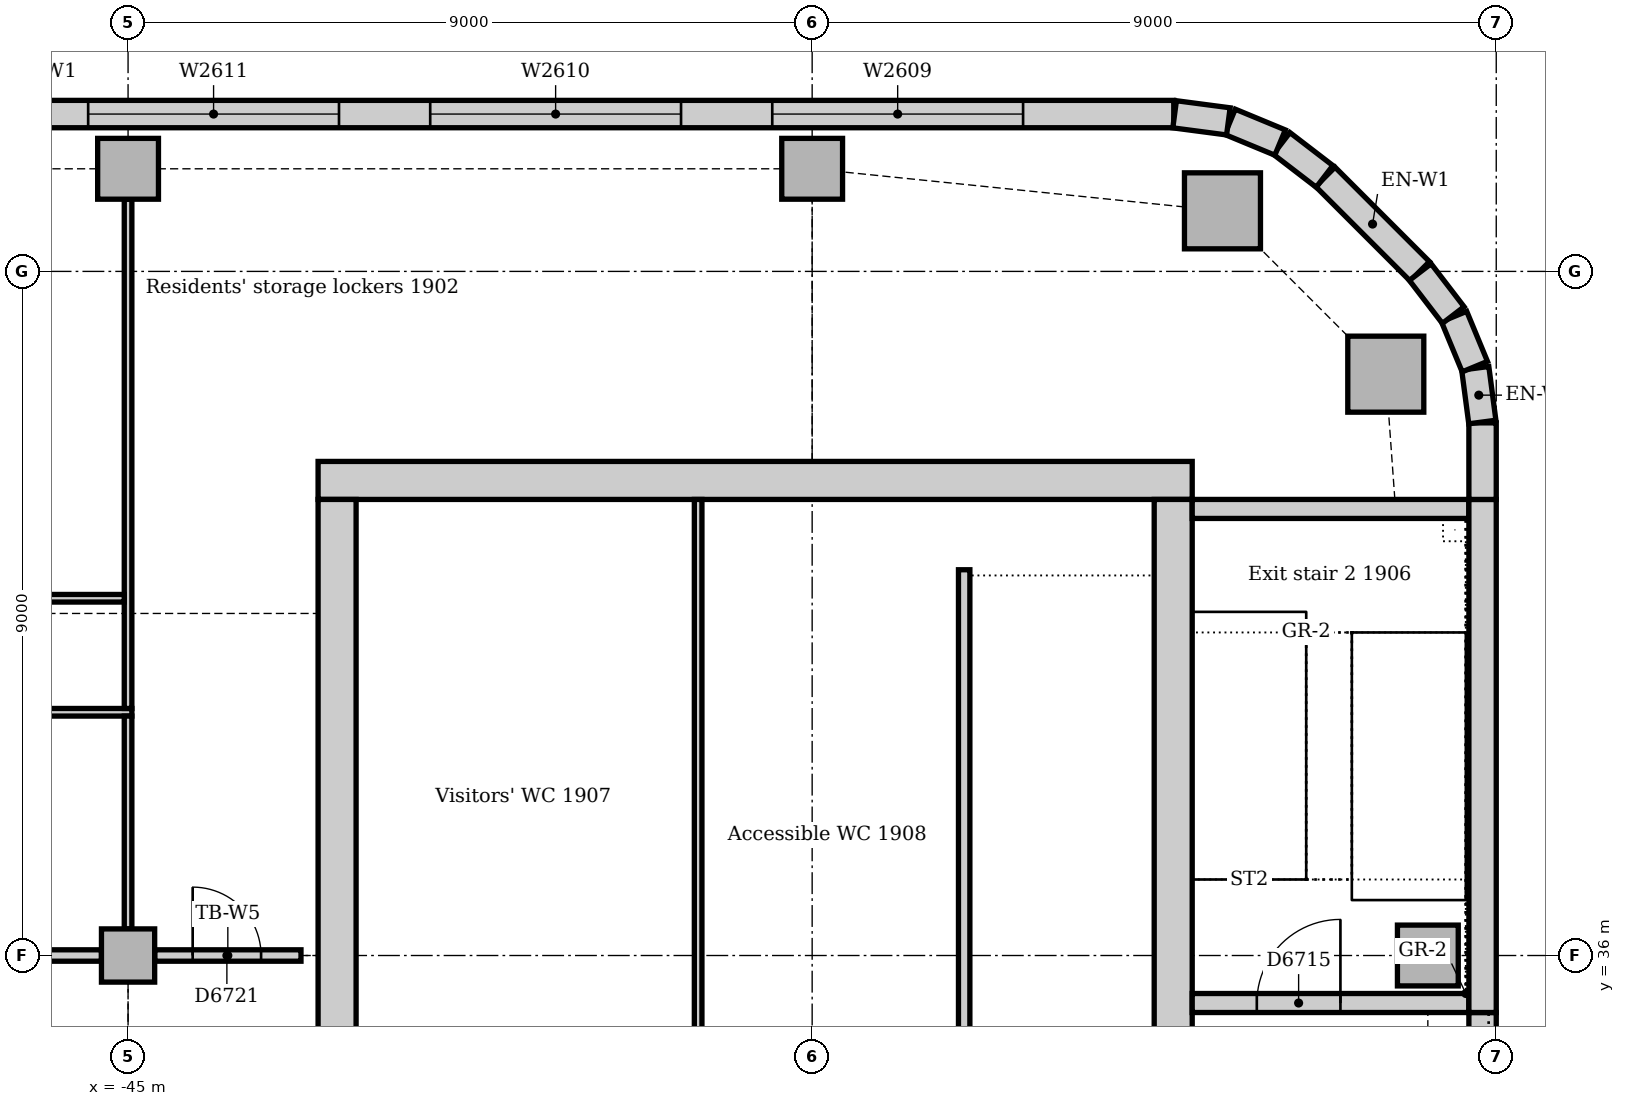
"""IFC4 building model, lengths in metres.
Left out: names, types, materials, properties, quantities, classifications, styles, units other than length and angle.
Written with IfcOpenShell. Run it as: python <this file> out.ifc"""

import sys

from ifc_helpers import new_model, si_unit, direction, frame, frame_2d, origin, origin_2d, place, context, subcontext, project, spatial, rectangle, extrude, element, fill, save


model = new_model("IFC4")
c1 = context("Model", 3, precision=1e-05, world=origin(), true_north=direction((0.0, 1.0)))
c2 = subcontext(c1, "Body", "Model", "MODEL_VIEW")
j1 = project(units=[si_unit("LENGTHUNIT", "METRE"), si_unit("PLANEANGLEUNIT", "RADIAN")], contexts=[c1])
p1 = place(None, origin())
s1 = spatial("IfcSite", under=j1, at=p1, CompositionType="ELEMENT")
p2 = place(p1, origin())
s2 = spatial("IfcBuilding", under=s1, at=p2, CompositionType="ELEMENT")
p3 = place(p2, frame((0.0, 0.0, 83.0)))
s3 = spatial("IfcBuildingStorey", under=s2, at=p3, CompositionType="ELEMENT", Elevation=83.0)
p4 = place(p3, frame((-31.0, 42.25, 0.0), z_axis=(0.0, 0.0, 1.0), x_axis=(-1.0, 0.0, 0.0)))
e1 = element("IfcWall", 1, at=p4, inside=s3, PredefinedType="SOLIDWALL", context=c2, shape_type="SweptSolid", body=[
    extrude(rectangle(XDim=11.5, YDim=0.5, at=frame_2d((5.75, 0.0))), origin(), (0.0, 0.0, 1.0), 4.0),
])
p5 = place(p3, frame((-31.25, 30.5, 0.0), z_axis=(0.0, 0.0, 1.0), x_axis=(0.0, 1.0, 0.0)))
e2 = element("IfcWall", 2, at=p5, inside=s3, PredefinedType="SOLIDWALL", context=c2, shape_type="SweptSolid", body=[
    extrude(rectangle(XDim=11.5, YDim=0.5, at=frame_2d((5.75, 0.0))), origin(), (0.0, 0.0, 1.0), 4.0),
])
p6 = place(p5, frame((0.85, 0.0, 0.0)))
e3 = element("IfcOpeningElement", 3, at=p6, cuts=e2, PredefinedType="OPENING", context=c2, shape_type="SweptSolid", body=[
    extrude(rectangle(XDim=1.8, YDim=2.1, at=frame_2d((0.9, 1.05))), frame((0.0, 0.26, 0.0), z_axis=(0.0, -1.0, 0.0), x_axis=(1.0, 0.0, 0.0)), (0.0, 0.0, 1.0), 0.52),
])
p7 = place(p3, frame((-42.25, 42.0, 0.0), z_axis=(0.0, 0.0, 1.0), x_axis=(0.0, -1.0, 0.0)))
e4 = element("IfcWall", 4, at=p7, inside=s3, PredefinedType="SOLIDWALL", context=c2, shape_type="SweptSolid", body=[
    extrude(rectangle(XDim=11.5, YDim=0.5, at=frame_2d((5.75, 0.0))), origin(), (0.0, 0.0, 1.0), 4.0),
])
p8 = place(p7, frame((8.85, 0.0, 0.0)))
e5 = element("IfcOpeningElement", 5, at=p8, cuts=e4, PredefinedType="OPENING", context=c2, shape_type="SweptSolid", body=[
    extrude(rectangle(XDim=1.8, YDim=2.1, at=frame_2d((0.9, 1.05))), frame((0.0, 0.26, 0.0), z_axis=(0.0, -1.0, 0.0), x_axis=(1.0, 0.0, 0.0)), (0.0, 0.0, 1.0), 0.52),
])
p9 = place(p3, frame((-31.0, 35.375, 0.0), z_axis=(0.0, 0.0, 1.0), x_axis=(1.0, 0.0, 0.0)))
e6 = element("IfcWall", 6, at=p9, inside=s3, PredefinedType="SOLIDWALL", context=c2, shape_type="SweptSolid", body=[
    extrude(rectangle(XDim=3.64, YDim=0.25, at=frame_2d((1.82, 0.0))), origin(), (0.0, 0.0, 1.0), 4.0),
])
p10 = place(p9, frame((0.85, 0.0, 0.0)))
e7 = element("IfcOpeningElement", 7, at=p10, cuts=e6, PredefinedType="OPENING", context=c2, shape_type="SweptSolid", body=[
    extrude(rectangle(XDim=1.1, YDim=2.1, at=frame_2d((0.55, 1.05))), frame((0.0, 0.135, 0.0), z_axis=(0.0, -1.0, 0.0), x_axis=(1.0, 0.0, 0.0)), (0.0, 0.0, 1.0), 0.27),
])
p11 = place(p3, frame((-27.36, 41.875, 0.0), z_axis=(0.0, 0.0, 1.0), x_axis=(-1.0, 0.0, 0.0)))
e8 = element("IfcWall", 8, at=p11, inside=s3, PredefinedType="SOLIDWALL", context=c2, shape_type="SweptSolid", body=[
    extrude(rectangle(XDim=3.64, YDim=0.25, at=frame_2d((1.82, 0.0))), origin(), (0.0, 0.0, 1.0), 4.0),
])
for number, where, z_axis, x_axis in (
    (9, (-28.453, 43.648, 0.0), (0.0, 0.0, 1.0), (1.0, 0.0, 0.0)),
    (10, (-30.602, 45.797, 0.0), (0.0, 0.0, 1.0), (1.0, 0.0, 0.0)),
):
    element("IfcColumn", number, at=place(p3, frame(where, z_axis=z_axis, x_axis=x_axis)), inside=s3, PredefinedType="COLUMN", context=c2, shape_type="SweptSolid", body=[
        extrude(rectangle(XDim=1.0, YDim=1.0, at=origin_2d()), origin(), (0.0, 0.0, 1.0), 3.85),
    ])
p12 = place(p3, frame((-27.9, 36.0, 0.0), z_axis=(0.0, 0.0, 1.0), x_axis=(1.0, 0.0, 0.0)))
e11 = element("IfcColumn", 11, at=p12, inside=s3, PredefinedType="COLUMN", context=c2, shape_type="SweptSolid", body=[
    extrude(rectangle(XDim=0.8, YDim=0.8, at=origin_2d()), origin(), (0.0, 0.0, 1.0), 4.0),
])
for number, where, z_axis, x_axis in (
    (12, (-45.0, 46.35, 0.0), (0.0, 0.0, 1.0), (1.0, 0.0, 0.0)),
    (13, (-36.0, 46.35, 0.0), (0.0, 0.0, 1.0), (1.0, 0.0, 0.0)),
):
    element("IfcColumn", number, at=place(p3, frame(where, z_axis=z_axis, x_axis=x_axis)), inside=s3, PredefinedType="COLUMN", context=c2, shape_type="SweptSolid", body=[
        extrude(rectangle(XDim=0.8, YDim=0.8, at=origin_2d()), origin(), (0.0, 0.0, 1.0), 3.85),
    ])
p13 = place(p3, frame((-45.0, 36.0, 0.0), z_axis=(0.0, 0.0, 1.0), x_axis=(1.0, 0.0, 0.0)))
e14 = element("IfcColumn", 14, at=p13, inside=s3, PredefinedType="COLUMN", context=c2, shape_type="SweptSolid", body=[
    extrude(rectangle(XDim=0.7, YDim=0.7, at=origin_2d()), origin(), (0.0, 0.0, 1.0), 3.85),
])
p14 = place(p3, frame((-27.18, 27.75, 0.0), z_axis=(0.0, 0.0, 1.0), x_axis=(0.0, 1.0, 0.0)))
e15 = element("IfcWall", 15, at=p14, inside=s3, PredefinedType="STANDARD", context=c2, shape_type="SweptSolid", body=[
    extrude(rectangle(XDim=7.5, YDim=0.36, at=frame_2d((3.75, 0.0))), origin(), (0.0, 0.0, 1.0), 3.85),
])
p15 = place(p14, frame((2.85, 0.0, 1.2)))
e16 = element("IfcOpeningElement", 16, at=p15, cuts=e15, PredefinedType="OPENING", context=c2, shape_type="SweptSolid", body=[
    extrude(rectangle(XDim=1.8, YDim=1.2, at=frame_2d((0.9, 0.6))), frame((0.0, 0.19, 0.0), z_axis=(0.0, -1.0, 0.0), x_axis=(1.0, 0.0, 0.0)), (0.0, 0.0, 1.0), 0.38),
])
p16 = place(p3, frame((-27.18, 35.25, 0.0), z_axis=(0.0, 0.0, 1.0), x_axis=(0.0, 1.0, 0.0)))
e17 = element("IfcWall", 17, at=p16, inside=s3, PredefinedType="STANDARD", context=c2, shape_type="SweptSolid", body=[
    extrude(rectangle(XDim=6.75, YDim=0.36, at=frame_2d((3.375, 0.0))), origin(), (0.0, 0.0, 1.0), 3.85),
])
p17 = place(p3, frame((-27.18, 42.0, 0.0), z_axis=(0.0, 0.0, 1.0), x_axis=(0.0, 1.0, 0.0)))
e18 = element("IfcWall", 18, at=p17, inside=s3, PredefinedType="STANDARD", context=c2, shape_type="SweptSolid", body=[
    extrude(rectangle(XDim=1.007, YDim=0.36, at=frame_2d((0.504, 0.0))), origin(), (0.0, 0.0, 1.0), 3.85),
])
p18 = place(p3, frame((-28.006, 45.001, 0.0), z_axis=(0.0, 0.0, 1.0), x_axis=(-0.707106781187, 0.707106781187, 0.0)))
e19 = element("IfcWall", 19, at=p18, inside=s3, PredefinedType="STANDARD", context=c2, shape_type="SweptSolid", body=[
    extrude(rectangle(XDim=1.757, YDim=0.36, at=frame_2d((0.879, 0.0))), origin(), (0.0, 0.0, 1.0), 3.85),
])
p19 = place(p3, frame((-31.243, 47.07, 0.0), z_axis=(0.0, 0.0, 1.0), x_axis=(-1.0, 0.0, 0.0)))
e20 = element("IfcWall", 20, at=p19, inside=s3, PredefinedType="STANDARD", context=c2, shape_type="SweptSolid", body=[
    extrude(rectangle(XDim=29.765, YDim=0.36, at=frame_2d((14.882, 0.0))), origin(), (0.0, 0.0, 1.0), 3.85),
])
p20 = place(p19, frame((1.982, 0.0, 0.9)))
e21 = element("IfcOpeningElement", 21, at=p20, cuts=e20, PredefinedType="OPENING", context=c2, shape_type="SweptSolid", body=[
    extrude(rectangle(XDim=3.3, YDim=1.6, at=frame_2d((1.65, 0.8))), frame((0.0, 0.19, 0.0), z_axis=(0.0, -1.0, 0.0), x_axis=(1.0, 0.0, 0.0)), (0.0, 0.0, 1.0), 0.38),
])
p21 = place(p19, frame((6.482, 0.0, 0.9)))
e22 = element("IfcOpeningElement", 22, at=p21, cuts=e20, PredefinedType="OPENING", context=c2, shape_type="SweptSolid", body=[
    extrude(rectangle(XDim=3.3, YDim=1.6, at=frame_2d((1.65, 0.8))), frame((0.0, 0.19, 0.0), z_axis=(0.0, -1.0, 0.0), x_axis=(1.0, 0.0, 0.0)), (0.0, 0.0, 1.0), 0.38),
])
p22 = place(p19, frame((10.982, 0.0, 0.9)))
e23 = element("IfcOpeningElement", 23, at=p22, cuts=e20, PredefinedType="OPENING", context=c2, shape_type="SweptSolid", body=[
    extrude(rectangle(XDim=3.3, YDim=1.6, at=frame_2d((1.65, 0.8))), frame((0.0, 0.19, 0.0), z_axis=(0.0, -1.0, 0.0), x_axis=(1.0, 0.0, 0.0)), (0.0, 0.0, 1.0), 0.38),
])
p23 = place(p19, frame((15.482, 0.0, 0.9)))
e24 = element("IfcOpeningElement", 24, at=p23, cuts=e20, PredefinedType="OPENING", context=c2, shape_type="SweptSolid", body=[
    extrude(rectangle(XDim=3.3, YDim=1.6, at=frame_2d((1.65, 0.8))), frame((0.0, 0.19, 0.0), z_axis=(0.0, -1.0, 0.0), x_axis=(1.0, 0.0, 0.0)), (0.0, 0.0, 1.0), 0.38),
])
p24 = place(p19, frame((19.982, 0.0, 0.9)))
e25 = element("IfcOpeningElement", 25, at=p24, cuts=e20, PredefinedType="OPENING", context=c2, shape_type="SweptSolid", body=[
    extrude(rectangle(XDim=3.3, YDim=1.6, at=frame_2d((1.65, 0.8))), frame((0.0, 0.19, 0.0), z_axis=(0.0, -1.0, 0.0), x_axis=(1.0, 0.0, 0.0)), (0.0, 0.0, 1.0), 0.38),
])
p25 = place(p19, frame((24.482, 0.0, 0.9)))
e26 = element("IfcOpeningElement", 26, at=p25, cuts=e20, PredefinedType="OPENING", context=c2, shape_type="SweptSolid", body=[
    extrude(rectangle(XDim=3.3, YDim=1.6, at=frame_2d((1.65, 0.8))), frame((0.0, 0.19, 0.0), z_axis=(0.0, -1.0, 0.0), x_axis=(1.0, 0.0, 0.0)), (0.0, 0.0, 1.0), 0.38),
])
for number, where, z_axis, x_axis in (
    (27, (-27.183, 43.019, 0.0), (0.0, 0.0, 1.0), (-0.131, 0.991, 0.0)),
    (28, (-27.282, 43.747, 0.0), (0.0, 0.0, 1.0), (-0.383, 0.924, 0.0)),
):
    element("IfcWall", number, at=place(p3, frame(where, z_axis=z_axis, x_axis=x_axis)), inside=s3, PredefinedType="STANDARD", context=c2, shape_type="SweptSolid", body=[
        extrude(rectangle(XDim=0.713, YDim=0.36, at=frame_2d((0.356, 0.0))), origin(), (0.0, 0.0, 1.0), 3.85),
    ])
for number, where, z_axis, x_axis in (
    (29, (-27.566, 44.425, 0.0), (0.0, 0.0, 1.0), (-0.609, 0.793, 0.0)),
    (30, (-29.259, 46.25, 0.0), (0.0, 0.0, 1.0), (-0.793, 0.609, 0.0)),
):
    element("IfcWall", number, at=place(p3, frame(where, z_axis=z_axis, x_axis=x_axis)), inside=s3, PredefinedType="STANDARD", context=c2, shape_type="SweptSolid", body=[
        extrude(rectangle(XDim=0.713, YDim=0.36, at=frame_2d((0.357, 0.0))), origin(), (0.0, 0.0, 1.0), 3.85),
    ])
for number, where, z_axis, x_axis in (
    (31, (-29.844, 46.695, 0.0), (0.0, 0.0, 1.0), (-0.924, 0.383, 0.0)),
    (32, (-30.524, 46.974, 0.0), (0.0, 0.0, 1.0), (-0.991, 0.131, 0.0)),
):
    element("IfcWall", number, at=place(p3, frame(where, z_axis=z_axis, x_axis=x_axis)), inside=s3, PredefinedType="STANDARD", context=c2, shape_type="SweptSolid", body=[
        extrude(rectangle(XDim=0.713, YDim=0.36, at=frame_2d((0.356, 0.0))), origin(), (0.0, 0.0, 1.0), 3.85),
    ])
p26 = place(p3, frame((-34.0, 41.075, 0.0), z_axis=(0.0, 0.0, 1.0), x_axis=(0.0, -1.0, 0.0)))
e33 = element("IfcWall", 33, at=p26, inside=s3, PredefinedType="SOLIDWALL", context=c2, shape_type="SweptSolid", body=[
    extrude(rectangle(XDim=7.0, YDim=0.15, at=frame_2d((3.5, 0.0))), origin(), (0.0, 0.0, 1.0), 4.0),
])
p27 = place(p3, frame((-37.5, 34.075, 0.0), z_axis=(0.0, 0.0, 1.0), x_axis=(0.0, 1.0, 0.0)))
e34 = element("IfcWall", 34, at=p27, inside=s3, PredefinedType="PARTITIONING", context=c2, shape_type="SweptSolid", body=[
    extrude(rectangle(XDim=7.925, YDim=0.1, at=frame_2d((3.962, 0.0))), origin(), (0.0, 0.0, 1.0), 3.85),
])
p28 = place(p3, frame((-44.65, 36.0, 0.0), z_axis=(0.0, 0.0, 1.0), x_axis=(1.0, 0.0, 0.0)))
e35 = element("IfcWall", 35, at=p28, inside=s3, PredefinedType="PARTITIONING", context=c2, shape_type="SweptSolid", body=[
    extrude(rectangle(XDim=1.925, YDim=0.15, at=frame_2d((0.963, 0.0))), origin(), (0.0, 0.0, 1.0), 3.602),
])
p29 = place(p28, frame((0.5, 0.0, 0.0)))
e36 = element("IfcOpeningElement", 36, at=p29, cuts=e35, PredefinedType="OPENING", context=c2, shape_type="SweptSolid", body=[
    extrude(rectangle(XDim=0.9, YDim=2.1, at=frame_2d((0.45, 1.05))), frame((0.0, 0.085, 0.0), z_axis=(0.0, -1.0, 0.0), x_axis=(1.0, 0.0, 0.0)), (0.0, 0.0, 1.0), 0.17),
])
p30 = place(p3, frame((-53.65, 36.0, 0.0), z_axis=(0.0, 0.0, 1.0), x_axis=(1.0, 0.0, 0.0)))
e37 = element("IfcWall", 37, at=p30, inside=s3, PredefinedType="PARTITIONING", context=c2, shape_type="SweptSolid", body=[
    extrude(rectangle(XDim=8.3, YDim=0.15, at=frame_2d((4.15, 0.0))), origin(), (0.0, 0.0, 1.0), 3.158),
])
p31 = place(p30, frame((2.055, 0.0, 0.0)))
e38 = element("IfcOpeningElement", 38, at=p31, cuts=e37, PredefinedType="OPENING", context=c2, shape_type="SweptSolid", body=[
    extrude(rectangle(XDim=1.0, YDim=2.1, at=frame_2d((0.5, 1.05))), frame((0.0, 0.085, 0.0), z_axis=(0.0, -1.0, 0.0), x_axis=(1.0, 0.0, 0.0)), (0.0, 0.0, 1.0), 0.17),
])
p32 = place(p3, frame((-55.425, 39.2, 0.0), z_axis=(0.0, 0.0, 1.0), x_axis=(1.0, 0.0, 0.0)))
e39 = element("IfcWall", 39, at=p32, inside=s3, PredefinedType="PARTITIONING", context=c2, shape_type="SweptSolid", body=[
    extrude(rectangle(XDim=10.475, YDim=0.1, at=frame_2d((5.237, 0.0))), origin(), (0.0, 0.0, 1.0), 3.85),
])
p33 = place(p32, frame((3.53, 0.0, 0.0)))
e40 = element("IfcOpeningElement", 40, at=p33, cuts=e39, PredefinedType="OPENING", context=c2, shape_type="SweptSolid", body=[
    extrude(rectangle(XDim=0.9, YDim=2.1, at=frame_2d((0.45, 1.05))), frame((0.0, 0.06, 0.0), z_axis=(0.0, -1.0, 0.0), x_axis=(1.0, 0.0, 0.0)), (0.0, 0.0, 1.0), 0.12),
])
p34 = place(p3, frame((-45.0, 39.25, 0.0), z_axis=(0.0, 0.0, 1.0), x_axis=(0.0, 1.0, 0.0)))
e41 = element("IfcWall", 41, at=p34, inside=s3, PredefinedType="PARTITIONING", context=c2, shape_type="SweptSolid", body=[
    extrude(rectangle(XDim=6.7, YDim=0.1, at=frame_2d((3.35, 0.0))), origin(), (0.0, 0.0, 1.0), 3.256),
])
p35 = place(p3, frame((-45.0, 36.35, 0.0), z_axis=(0.0, 0.0, 1.0), x_axis=(0.0, 1.0, 0.0)))
e42 = element("IfcWall", 42, at=p35, inside=s3, PredefinedType="PARTITIONING", context=c2, shape_type="SweptSolid", body=[
    extrude(rectangle(XDim=2.8, YDim=0.1, at=frame_2d((1.4, 0.0))), origin(), (0.0, 0.0, 1.0), 3.256),
])
p36 = place(p3, frame((-55.425, 40.7, 0.0), z_axis=(0.0, 0.0, 1.0), x_axis=(1.0, 0.0, 0.0)))
e43 = element("IfcWall", 43, at=p36, inside=s3, PredefinedType="PARTITIONING", context=c2, shape_type="SweptSolid", body=[
    extrude(rectangle(XDim=10.375, YDim=0.1, at=frame_2d((5.188, 0.0))), origin(), (0.0, 0.0, 1.0), 3.85),
])
p37 = place(p36, frame((2.0, 0.0, 0.0)))
e44 = element("IfcOpeningElement", 44, at=p37, cuts=e43, PredefinedType="OPENING", context=c2, shape_type="SweptSolid", body=[
    extrude(rectangle(XDim=0.9, YDim=2.1, at=frame_2d((0.45, 1.05))), frame((0.0, 0.06, 0.0), z_axis=(0.0, -1.0, 0.0), x_axis=(1.0, 0.0, 0.0)), (0.0, 0.0, 1.0), 0.12),
])
p38 = place(p36, frame((7.045, 0.0, 0.0)))
e45 = element("IfcOpeningElement", 45, at=p38, cuts=e43, PredefinedType="OPENING", context=c2, shape_type="SweptSolid", body=[
    extrude(rectangle(XDim=0.9, YDim=2.1, at=frame_2d((0.45, 1.05))), frame((0.0, 0.06, 0.0), z_axis=(0.0, -1.0, 0.0), x_axis=(1.0, 0.0, 0.0)), (0.0, 0.0, 1.0), 0.12),
])
p39 = place(p20, origin())
e46 = element("IfcWindow", 46, at=p39, inside=s3, PartitioningType="SINGLE_PANEL", PredefinedType="WINDOW", context=c2, shape_type="SweptSolid", body=[
    extrude(rectangle(XDim=3.3, YDim=1.6, at=frame_2d((1.65, 0.8))), frame((0.0, 0.13, 0.0), z_axis=(0.0, -1.0, 0.0), x_axis=(1.0, 0.0, 0.0)), (0.0, 0.0, 1.0), 0.06),
])
fill(e21, e46)
p40 = place(p21, origin())
e47 = element("IfcWindow", 47, at=p40, inside=s3, PartitioningType="SINGLE_PANEL", PredefinedType="WINDOW", context=c2, shape_type="SweptSolid", body=[
    extrude(rectangle(XDim=3.3, YDim=1.6, at=frame_2d((1.65, 0.8))), frame((0.0, 0.13, 0.0), z_axis=(0.0, -1.0, 0.0), x_axis=(1.0, 0.0, 0.0)), (0.0, 0.0, 1.0), 0.06),
])
fill(e22, e47)
p41 = place(p22, origin())
e48 = element("IfcWindow", 48, at=p41, inside=s3, PartitioningType="SINGLE_PANEL", PredefinedType="WINDOW", context=c2, shape_type="SweptSolid", body=[
    extrude(rectangle(XDim=3.3, YDim=1.6, at=frame_2d((1.65, 0.8))), frame((0.0, 0.13, 0.0), z_axis=(0.0, -1.0, 0.0), x_axis=(1.0, 0.0, 0.0)), (0.0, 0.0, 1.0), 0.06),
])
fill(e23, e48)
p42 = place(p10, origin())
e49 = element("IfcDoor", 49, at=p42, inside=s3, OperationType="SINGLE_SWING_RIGHT", PredefinedType="DOOR", context=c2, shape_type="SweptSolid", body=[
    extrude(rectangle(XDim=1.1, YDim=2.1, at=frame_2d((0.55, 1.05))), frame((0.0, 0.025, 0.0), z_axis=(0.0, -1.0, 0.0), x_axis=(1.0, 0.0, 0.0)), (0.0, 0.0, 1.0), 0.05),
])
fill(e7, e49)
p43 = place(p29, origin())
e50 = element("IfcDoor", 50, at=p43, inside=s3, OperationType="SINGLE_SWING_LEFT", PredefinedType="DOOR", context=c2, shape_type="SweptSolid", body=[
    extrude(rectangle(XDim=0.9, YDim=2.1, at=frame_2d((0.45, 1.05))), frame((0.0, 0.025, 0.0), z_axis=(0.0, -1.0, 0.0), x_axis=(1.0, 0.0, 0.0)), (0.0, 0.0, 1.0), 0.05),
])
fill(e36, e50)
save(model, sys.argv[1])
